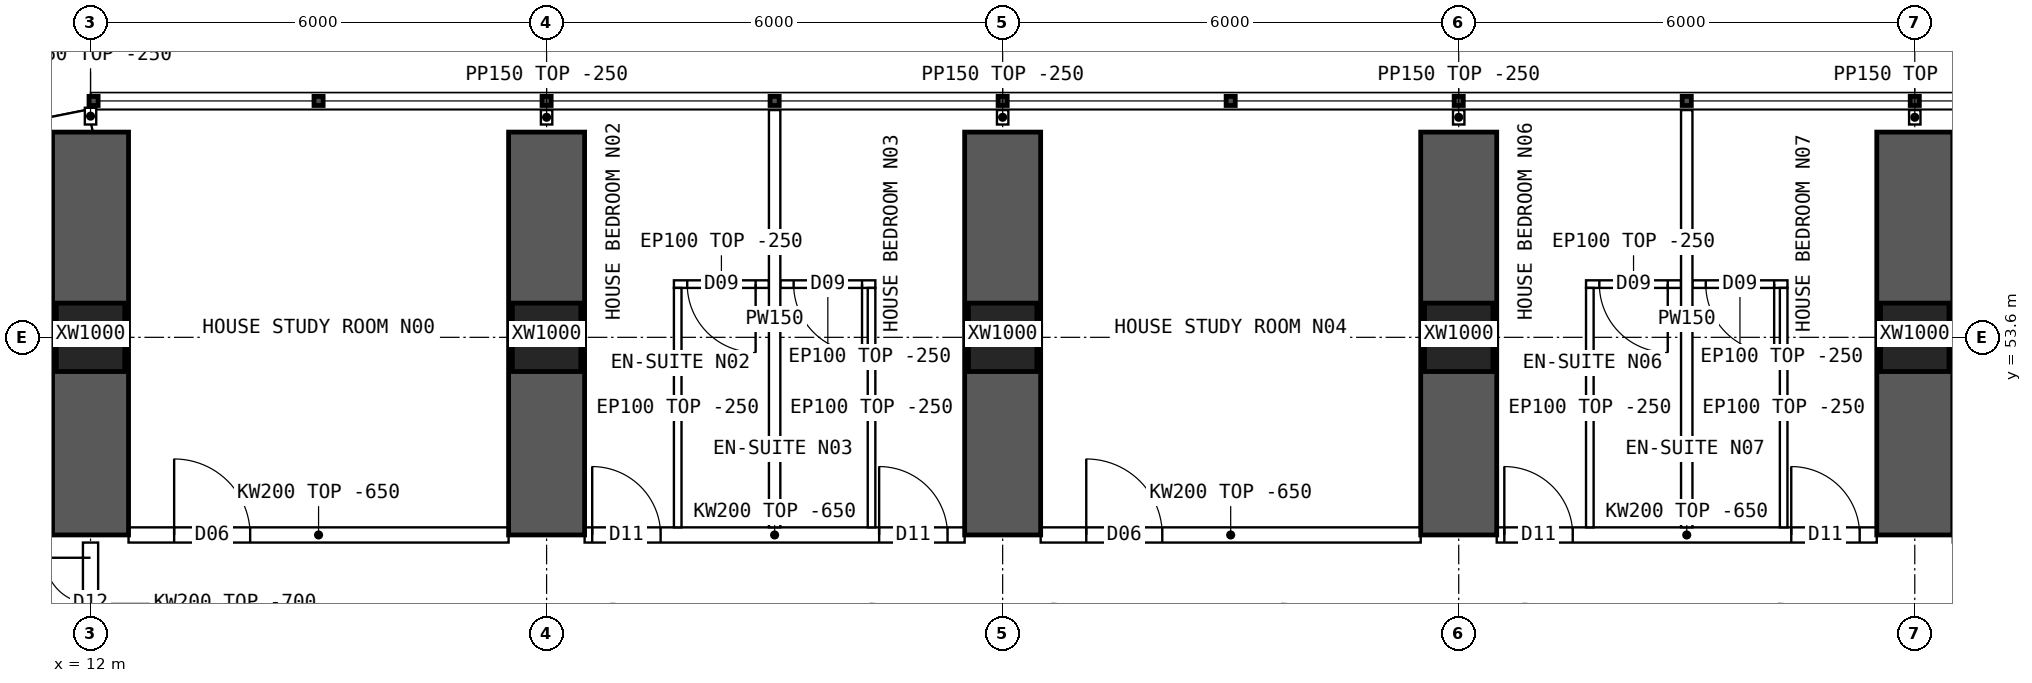
"""IFC4 building model, lengths in metres.
Left out: names, types, materials, properties, quantities, classifications, styles, units other than length and angle.
Written with IfcOpenShell. Run it as: python <this file> out.ifc"""

import sys

from ifc_helpers import new_model, si_unit, direction, frame, frame_2d, origin, origin_2d, place, context, subcontext, project, spatial, polyline, rectangle, hollow_rectangle, outline, extrude, element, fill, save


model = new_model("IFC4")
c1 = context("Model", 3, precision=1e-05, world=origin(), true_north=direction((0.0, 1.0)))
c2 = subcontext(c1, "Body", "Model", "MODEL_VIEW")
j1 = project(units=[si_unit("LENGTHUNIT", "METRE"), si_unit("PLANEANGLEUNIT", "RADIAN")], contexts=[c1])
p1 = place(None, origin())
s1 = spatial("IfcSite", under=j1, at=p1, CompositionType="ELEMENT")
p2 = place(p1, origin())
s2 = spatial("IfcBuilding", under=s1, at=p2, CompositionType="ELEMENT")
p3 = place(p2, frame((0.0, 0.0, 53.95)))
s3 = spatial("IfcBuildingStorey", under=s2, at=p3, CompositionType="ELEMENT", Elevation=53.95)
for number, where, z_axis, x_axis in (
    (1, (12.0, 53.6, 0.0), (0.0, 0.0, 1.0), (1.0, 0.0, 0.0)),
    (2, (18.0, 53.6, 0.0), (0.0, 0.0, 1.0), (1.0, 0.0, 0.0)),
    (3, (24.0, 53.6, 0.0), (0.0, 0.0, 1.0), (1.0, 0.0, 0.0)),
    (4, (30.0, 53.6, 0.0), (0.0, 0.0, 1.0), (1.0, 0.0, 0.0)),
    (5, (36.0, 53.6, 0.0), (0.0, 0.0, 1.0), (1.0, 0.0, 0.0)),
):
    element("IfcColumn", number, at=place(p3, frame(where, z_axis=z_axis, x_axis=x_axis)), inside=s3, PredefinedType="COLUMN", context=c2, shape_type="SweptSolid", body=[
        extrude(hollow_rectangle(XDim=0.9, YDim=0.9, WallThickness=0.09, at=origin_2d()), origin(), (0.0, 0.0, 1.0), 3.75),
    ])
for number, where, z_axis, x_axis in (
    (6, (12.0, 51.0, 0.0), (0.0, 0.0, 1.0), (0.0, 1.0, 0.0)),
    (7, (18.0, 51.0, 0.0), (0.0, 0.0, 1.0), (0.0, 1.0, 0.0)),
    (8, (24.0, 51.0, 0.0), (0.0, 0.0, 1.0), (0.0, 1.0, 0.0)),
    (9, (30.0, 51.0, 0.0), (0.0, 0.0, 1.0), (0.0, 1.0, 0.0)),
    (10, (36.0, 51.0, 0.0), (0.0, 0.0, 1.0), (0.0, 1.0, 0.0)),
):
    element("IfcWall", number, at=place(p3, frame(where, z_axis=z_axis, x_axis=x_axis)), inside=s3, PredefinedType="SHEAR", context=c2, shape_type="SweptSolid", body=[
        extrude(rectangle(XDim=5.3, YDim=1.0, at=frame_2d((2.65, 0.0))), origin(), (0.0, 0.0, 1.0), 3.75),
    ])
p4 = place(p3, frame((12.0, 56.45, 0.0), z_axis=(0.0, 0.0, 1.0), x_axis=(-0.980787251524, -0.195080412259, 0.0)))
e11 = element("IfcWall", 11, at=p4, inside=s3, PredefinedType="SOLIDWALL", context=c2, shape_type="SweptSolid", body=[
    extrude(outline(polyline([(-0.03, -0.15), (3.249, -0.15), (3.189, 0.15), (0.03, 0.15), (-0.03, -0.15)])), origin(), (0.0, 0.0, 1.0), 3.5),
])
p5 = place(p4, frame((0.909, 0.0, 0.9)))
e12 = element("IfcOpeningElement", 12, at=p5, cuts=e11, PredefinedType="OPENING", context=c2, shape_type="SweptSolid", body=[
    extrude(rectangle(XDim=1.4, YDim=1.8, at=frame_2d((0.7, 0.9))), frame((0.0, 0.16, 0.0), z_axis=(0.0, -1.0, 0.0), x_axis=(1.0, 0.0, 0.0)), (0.0, 0.0, 1.0), 0.32),
])
p6 = place(p3, frame((12.5, 51.0, 0.0), z_axis=(0.0, 0.0, 1.0), x_axis=(1.0, 0.0, 0.0)))
e13 = element("IfcWall", 13, at=p6, inside=s3, PredefinedType="SOLIDWALL", context=c2, shape_type="SweptSolid", body=[
    extrude(outline(polyline([(0.0, 0.0), (5.0, 0.0), (5.0, 3.1), (0.0, 3.1), (0.0, 0.0)])), frame((0.0, 0.1, 0.0), z_axis=(0.0, -1.0, 0.0), x_axis=(1.0, 0.0, 0.0)), (0.0, 0.0, 1.0), 0.2),
])
p7 = place(p6, frame((0.6, 0.0, 0.0)))
e14 = element("IfcOpeningElement", 14, at=p7, cuts=e13, PredefinedType="OPENING", context=c2, shape_type="SweptSolid", body=[
    extrude(rectangle(XDim=1.0, YDim=2.1, at=frame_2d((0.5, 1.05))), frame((0.0, 0.11, 0.0), z_axis=(0.0, -1.0, 0.0), x_axis=(1.0, 0.0, 0.0)), (0.0, 0.0, 1.0), 0.22),
])
p8 = place(p3, frame((18.5, 51.0, 0.0), z_axis=(0.0, 0.0, 1.0), x_axis=(1.0, 0.0, 0.0)))
e15 = element("IfcWall", 15, at=p8, inside=s3, PredefinedType="SOLIDWALL", context=c2, shape_type="SweptSolid", body=[
    extrude(outline(polyline([(0.0, 0.0), (5.0, 0.0), (5.0, 3.1), (0.0, 3.1), (0.0, 0.0)])), frame((0.0, 0.1, 0.0), z_axis=(0.0, -1.0, 0.0), x_axis=(1.0, 0.0, 0.0)), (0.0, 0.0, 1.0), 0.2),
])
p9 = place(p8, frame((0.1, 0.0, 0.0)))
e16 = element("IfcOpeningElement", 16, at=p9, cuts=e15, PredefinedType="OPENING", context=c2, shape_type="SweptSolid", body=[
    extrude(rectangle(XDim=0.9, YDim=2.1, at=frame_2d((0.45, 1.05))), frame((0.0, 0.11, 0.0), z_axis=(0.0, -1.0, 0.0), x_axis=(1.0, 0.0, 0.0)), (0.0, 0.0, 1.0), 0.22),
])
p10 = place(p8, frame((3.875, 0.0, 0.0)))
e17 = element("IfcOpeningElement", 17, at=p10, cuts=e15, PredefinedType="OPENING", context=c2, shape_type="SweptSolid", body=[
    extrude(rectangle(XDim=0.9, YDim=2.1, at=frame_2d((0.45, 1.05))), frame((0.0, 0.11, 0.0), z_axis=(0.0, -1.0, 0.0), x_axis=(1.0, 0.0, 0.0)), (0.0, 0.0, 1.0), 0.22),
])
p11 = place(p3, frame((24.5, 51.0, 0.0), z_axis=(0.0, 0.0, 1.0), x_axis=(1.0, 0.0, 0.0)))
e18 = element("IfcWall", 18, at=p11, inside=s3, PredefinedType="SOLIDWALL", context=c2, shape_type="SweptSolid", body=[
    extrude(outline(polyline([(0.0, 0.0), (5.0, 0.0), (5.0, 3.1), (0.0, 3.1), (0.0, 0.0)])), frame((0.0, 0.1, 0.0), z_axis=(0.0, -1.0, 0.0), x_axis=(1.0, 0.0, 0.0)), (0.0, 0.0, 1.0), 0.2),
])
p12 = place(p11, frame((0.6, 0.0, 0.0)))
e19 = element("IfcOpeningElement", 19, at=p12, cuts=e18, PredefinedType="OPENING", context=c2, shape_type="SweptSolid", body=[
    extrude(rectangle(XDim=1.0, YDim=2.1, at=frame_2d((0.5, 1.05))), frame((0.0, 0.11, 0.0), z_axis=(0.0, -1.0, 0.0), x_axis=(1.0, 0.0, 0.0)), (0.0, 0.0, 1.0), 0.22),
])
p13 = place(p3, frame((30.5, 51.0, 0.0), z_axis=(0.0, 0.0, 1.0), x_axis=(1.0, 0.0, 0.0)))
e20 = element("IfcWall", 20, at=p13, inside=s3, PredefinedType="SOLIDWALL", context=c2, shape_type="SweptSolid", body=[
    extrude(outline(polyline([(0.0, 0.0), (5.0, 0.0), (5.0, 3.1), (0.0, 3.1), (0.0, 0.0)])), frame((0.0, 0.1, 0.0), z_axis=(0.0, -1.0, 0.0), x_axis=(1.0, 0.0, 0.0)), (0.0, 0.0, 1.0), 0.2),
])
p14 = place(p13, frame((0.1, 0.0, 0.0)))
e21 = element("IfcOpeningElement", 21, at=p14, cuts=e20, PredefinedType="OPENING", context=c2, shape_type="SweptSolid", body=[
    extrude(rectangle(XDim=0.9, YDim=2.1, at=frame_2d((0.45, 1.05))), frame((0.0, 0.11, 0.0), z_axis=(0.0, -1.0, 0.0), x_axis=(1.0, 0.0, 0.0)), (0.0, 0.0, 1.0), 0.22),
])
p15 = place(p13, frame((3.875, 0.0, 0.0)))
e22 = element("IfcOpeningElement", 22, at=p15, cuts=e20, PredefinedType="OPENING", context=c2, shape_type="SweptSolid", body=[
    extrude(rectangle(XDim=0.9, YDim=2.1, at=frame_2d((0.45, 1.05))), frame((0.0, 0.11, 0.0), z_axis=(0.0, -1.0, 0.0), x_axis=(1.0, 0.0, 0.0)), (0.0, 0.0, 1.0), 0.22),
])
p16 = place(p3, frame((21.0, 56.59, 0.0), z_axis=(0.0, 0.0, 1.0), x_axis=(0.0, -1.0, 0.0)))
e23 = element("IfcWall", 23, at=p16, inside=s3, PredefinedType="PARTITIONING", context=c2, shape_type="SweptSolid", body=[
    extrude(outline(polyline([(0.0, 0.0), (5.49, 0.0), (5.49, 3.1), (5.442, 3.1), (5.44, 3.5), (3.192, 3.5), (3.19, 3.1), (2.792, 3.1), (2.79, 3.5), (0.0, 3.5), (0.0, 0.0)])), frame((0.0, 0.075, 0.0), z_axis=(0.0, -1.0, 0.0), x_axis=(1.0, 0.0, 0.0)), (0.0, 0.0, 1.0), 0.15),
])
p17 = place(p3, frame((19.675, 54.3, 0.0), z_axis=(0.0, 0.0, 1.0), x_axis=(1.0, 0.0, 0.0)))
e24 = element("IfcWall", 24, at=p17, inside=s3, PredefinedType="PARTITIONING", context=c2, shape_type="SweptSolid", body=[
    extrude(rectangle(XDim=1.25, YDim=0.1, at=frame_2d((0.625, 0.0))), origin(), (0.0, 0.0, 1.0), 3.5),
])
p18 = place(p17, frame((0.175, 0.0, 0.0)))
e25 = element("IfcOpeningElement", 25, at=p18, cuts=e24, PredefinedType="OPENING", context=c2, shape_type="SweptSolid", body=[
    extrude(rectangle(XDim=0.9, YDim=2.1, at=frame_2d((0.45, 1.05))), frame((0.0, 0.06, 0.0), z_axis=(0.0, -1.0, 0.0), x_axis=(1.0, 0.0, 0.0)), (0.0, 0.0, 1.0), 0.12),
])
p19 = place(p3, frame((19.725, 54.25, 0.0), z_axis=(0.0, 0.0, 1.0), x_axis=(0.0, -1.0, 0.0)))
e26 = element("IfcWall", 26, at=p19, inside=s3, PredefinedType="PARTITIONING", context=c2, shape_type="SweptSolid", body=[
    extrude(outline(polyline([(0.0, 0.0), (3.15, 0.0), (3.15, 3.1), (3.102, 3.1), (3.1, 3.5), (0.852, 3.5), (0.85, 3.1), (0.452, 3.1), (0.45, 3.5), (0.0, 3.5), (0.0, 0.0)])), frame((0.0, 0.05, 0.0), z_axis=(0.0, -1.0, 0.0), x_axis=(1.0, 0.0, 0.0)), (0.0, 0.0, 1.0), 0.1),
])
p20 = place(p3, frame((21.075, 54.3, 0.0), z_axis=(0.0, 0.0, 1.0), x_axis=(1.0, 0.0, 0.0)))
e27 = element("IfcWall", 27, at=p20, inside=s3, PredefinedType="PARTITIONING", context=c2, shape_type="SweptSolid", body=[
    extrude(rectangle(XDim=1.25, YDim=0.1, at=frame_2d((0.625, 0.0))), origin(), (0.0, 0.0, 1.0), 3.5),
])
p21 = place(p20, frame((0.175, 0.0, 0.0)))
e28 = element("IfcOpeningElement", 28, at=p21, cuts=e27, PredefinedType="OPENING", context=c2, shape_type="SweptSolid", body=[
    extrude(rectangle(XDim=0.9, YDim=2.1, at=frame_2d((0.45, 1.05))), frame((0.0, 0.06, 0.0), z_axis=(0.0, -1.0, 0.0), x_axis=(1.0, 0.0, 0.0)), (0.0, 0.0, 1.0), 0.12),
])
p22 = place(p3, frame((22.275, 54.25, 0.0), z_axis=(0.0, 0.0, 1.0), x_axis=(0.0, -1.0, 0.0)))
e29 = element("IfcWall", 29, at=p22, inside=s3, PredefinedType="PARTITIONING", context=c2, shape_type="SweptSolid", body=[
    extrude(outline(polyline([(0.0, 0.0), (3.15, 0.0), (3.15, 3.1), (3.102, 3.1), (3.1, 3.5), (0.852, 3.5), (0.85, 3.1), (0.452, 3.1), (0.45, 3.5), (0.0, 3.5), (0.0, 0.0)])), frame((0.0, 0.05, 0.0), z_axis=(0.0, -1.0, 0.0), x_axis=(1.0, 0.0, 0.0)), (0.0, 0.0, 1.0), 0.1),
])
p23 = place(p3, frame((33.0, 56.59, 0.0), z_axis=(0.0, 0.0, 1.0), x_axis=(0.0, -1.0, 0.0)))
e30 = element("IfcWall", 30, at=p23, inside=s3, PredefinedType="PARTITIONING", context=c2, shape_type="SweptSolid", body=[
    extrude(outline(polyline([(0.0, 0.0), (5.49, 0.0), (5.49, 3.1), (5.442, 3.1), (5.44, 3.5), (3.192, 3.5), (3.19, 3.1), (2.792, 3.1), (2.79, 3.5), (0.0, 3.5), (0.0, 0.0)])), frame((0.0, 0.075, 0.0), z_axis=(0.0, -1.0, 0.0), x_axis=(1.0, 0.0, 0.0)), (0.0, 0.0, 1.0), 0.15),
])
p24 = place(p3, frame((31.675, 54.3, 0.0), z_axis=(0.0, 0.0, 1.0), x_axis=(1.0, 0.0, 0.0)))
e31 = element("IfcWall", 31, at=p24, inside=s3, PredefinedType="PARTITIONING", context=c2, shape_type="SweptSolid", body=[
    extrude(rectangle(XDim=1.25, YDim=0.1, at=frame_2d((0.625, 0.0))), origin(), (0.0, 0.0, 1.0), 3.5),
])
p25 = place(p24, frame((0.175, 0.0, 0.0)))
e32 = element("IfcOpeningElement", 32, at=p25, cuts=e31, PredefinedType="OPENING", context=c2, shape_type="SweptSolid", body=[
    extrude(rectangle(XDim=0.9, YDim=2.1, at=frame_2d((0.45, 1.05))), frame((0.0, 0.06, 0.0), z_axis=(0.0, -1.0, 0.0), x_axis=(1.0, 0.0, 0.0)), (0.0, 0.0, 1.0), 0.12),
])
p26 = place(p3, frame((31.725, 54.25, 0.0), z_axis=(0.0, 0.0, 1.0), x_axis=(0.0, -1.0, 0.0)))
e33 = element("IfcWall", 33, at=p26, inside=s3, PredefinedType="PARTITIONING", context=c2, shape_type="SweptSolid", body=[
    extrude(outline(polyline([(0.0, 0.0), (3.15, 0.0), (3.15, 3.1), (3.102, 3.1), (3.1, 3.5), (0.852, 3.5), (0.85, 3.1), (0.452, 3.1), (0.45, 3.5), (0.0, 3.5), (0.0, 0.0)])), frame((0.0, 0.05, 0.0), z_axis=(0.0, -1.0, 0.0), x_axis=(1.0, 0.0, 0.0)), (0.0, 0.0, 1.0), 0.1),
])
p27 = place(p3, frame((33.075, 54.3, 0.0), z_axis=(0.0, 0.0, 1.0), x_axis=(1.0, 0.0, 0.0)))
e34 = element("IfcWall", 34, at=p27, inside=s3, PredefinedType="PARTITIONING", context=c2, shape_type="SweptSolid", body=[
    extrude(rectangle(XDim=1.25, YDim=0.1, at=frame_2d((0.625, 0.0))), origin(), (0.0, 0.0, 1.0), 3.5),
])
p28 = place(p27, frame((0.175, 0.0, 0.0)))
e35 = element("IfcOpeningElement", 35, at=p28, cuts=e34, PredefinedType="OPENING", context=c2, shape_type="SweptSolid", body=[
    extrude(rectangle(XDim=0.9, YDim=2.1, at=frame_2d((0.45, 1.05))), frame((0.0, 0.06, 0.0), z_axis=(0.0, -1.0, 0.0), x_axis=(1.0, 0.0, 0.0)), (0.0, 0.0, 1.0), 0.12),
])
p29 = place(p3, frame((34.275, 54.25, 0.0), z_axis=(0.0, 0.0, 1.0), x_axis=(0.0, -1.0, 0.0)))
e36 = element("IfcWall", 36, at=p29, inside=s3, PredefinedType="PARTITIONING", context=c2, shape_type="SweptSolid", body=[
    extrude(outline(polyline([(0.0, 0.0), (3.15, 0.0), (3.15, 3.1), (3.102, 3.1), (3.1, 3.5), (0.852, 3.5), (0.85, 3.1), (0.452, 3.1), (0.45, 3.5), (0.0, 3.5), (0.0, 0.0)])), frame((0.0, 0.05, 0.0), z_axis=(0.0, -1.0, 0.0), x_axis=(1.0, 0.0, 0.0)), (0.0, 0.0, 1.0), 0.1),
])
p30 = place(p3, frame((12.0, 49.3, 0.0), z_axis=(0.0, 0.0, 1.0), x_axis=(0.0, 1.0, 0.0)))
e37 = element("IfcWall", 37, at=p30, inside=s3, PredefinedType="SOLIDWALL", context=c2, shape_type="SweptSolid", body=[
    extrude(outline(polyline([(0.0, 0.0), (1.6, 0.0), (1.6, 3.05), (0.0, 3.05), (0.0, 0.0)])), frame((0.0, 0.1, 0.0), z_axis=(0.0, -1.0, 0.0), x_axis=(1.0, 0.0, 0.0)), (0.0, 0.0, 1.0), 0.2),
])
p31 = place(p30, frame((0.2, 0.0, 0.0)))
e38 = element("IfcOpeningElement", 38, at=p31, cuts=e37, PredefinedType="OPENING", context=c2, shape_type="SweptSolid", body=[
    extrude(rectangle(XDim=1.2, YDim=2.1, at=frame_2d((0.6, 1.05))), frame((0.0, 0.11, 0.0), z_axis=(0.0, -1.0, 0.0), x_axis=(1.0, 0.0, 0.0)), (0.0, 0.0, 1.0), 0.22),
])
p32 = place(p3, frame((12.0, 56.4, 0.0), z_axis=(0.0, 0.0, 1.0), x_axis=(0.0, 1.0, 0.0)))
e39 = element("IfcWall", 39, at=p32, inside=s3, PredefinedType="PARTITIONING", context=c2, shape_type="SweptSolid", body=[
    extrude(rectangle(XDim=0.22, YDim=0.15, at=frame_2d((0.11, 0.0))), origin(), (0.0, 0.0, 1.0), 3.5),
])
for number, where, z_axis, x_axis in (
    (40, (18.0, 56.4, 0.0), (0.0, 0.0, 1.0), (0.0, 1.0, 0.0)),
    (41, (24.0, 56.4, 0.0), (0.0, 0.0, 1.0), (0.0, 1.0, 0.0)),
    (42, (30.0, 56.4, 0.0), (0.0, 0.0, 1.0), (0.0, 1.0, 0.0)),
    (43, (36.0, 56.4, 0.0), (0.0, 0.0, 1.0), (0.0, 1.0, 0.0)),
):
    element("IfcWall", number, at=place(p3, frame(where, z_axis=z_axis, x_axis=x_axis)), inside=s3, PredefinedType="PARTITIONING", context=c2, shape_type="SweptSolid", body=[
        extrude(rectangle(XDim=0.19, YDim=0.15, at=frame_2d((0.095, 0.0))), origin(), (0.0, 0.0, 1.0), 3.5),
    ])
p33 = place(p7, origin())
e44 = element("IfcDoor", 44, at=p33, inside=s3, OperationType="SINGLE_SWING_LEFT", PredefinedType="DOOR", context=c2, shape_type="SweptSolid", body=[
    extrude(rectangle(XDim=1.0, YDim=2.1, at=frame_2d((0.5, 1.05))), frame((0.0, 0.025, 0.0), z_axis=(0.0, -1.0, 0.0), x_axis=(1.0, 0.0, 0.0)), (0.0, 0.0, 1.0), 0.05),
])
fill(e14, e44)
p34 = place(p18, origin())
e45 = element("IfcDoor", 45, at=p34, inside=s3, OperationType="SINGLE_SWING_RIGHT", PredefinedType="DOOR", context=c2, shape_type="SweptSolid", body=[
    extrude(rectangle(XDim=0.9, YDim=2.1, at=frame_2d((0.45, 1.05))), frame((0.0, 0.025, 0.0), z_axis=(0.0, -1.0, 0.0), x_axis=(1.0, 0.0, 0.0)), (0.0, 0.0, 1.0), 0.05),
])
fill(e25, e45)
p35 = place(p9, origin())
e46 = element("IfcDoor", 46, at=p35, inside=s3, OperationType="SINGLE_SWING_LEFT", PredefinedType="DOOR", context=c2, shape_type="SweptSolid", body=[
    extrude(rectangle(XDim=0.9, YDim=2.1, at=frame_2d((0.45, 1.05))), frame((0.0, 0.025, 0.0), z_axis=(0.0, -1.0, 0.0), x_axis=(1.0, 0.0, 0.0)), (0.0, 0.0, 1.0), 0.05),
])
fill(e16, e46)
p36 = place(p21, origin())
e47 = element("IfcDoor", 47, at=p36, inside=s3, OperationType="SINGLE_SWING_RIGHT", PredefinedType="DOOR", context=c2, shape_type="SweptSolid", body=[
    extrude(rectangle(XDim=0.9, YDim=2.1, at=frame_2d((0.45, 1.05))), frame((0.0, 0.025, 0.0), z_axis=(0.0, -1.0, 0.0), x_axis=(1.0, 0.0, 0.0)), (0.0, 0.0, 1.0), 0.05),
])
fill(e28, e47)
p37 = place(p10, origin())
e48 = element("IfcDoor", 48, at=p37, inside=s3, OperationType="SINGLE_SWING_LEFT", PredefinedType="DOOR", context=c2, shape_type="SweptSolid", body=[
    extrude(rectangle(XDim=0.9, YDim=2.1, at=frame_2d((0.45, 1.05))), frame((0.0, 0.025, 0.0), z_axis=(0.0, -1.0, 0.0), x_axis=(1.0, 0.0, 0.0)), (0.0, 0.0, 1.0), 0.05),
])
fill(e17, e48)
p38 = place(p12, origin())
e49 = element("IfcDoor", 49, at=p38, inside=s3, OperationType="SINGLE_SWING_LEFT", PredefinedType="DOOR", context=c2, shape_type="SweptSolid", body=[
    extrude(rectangle(XDim=1.0, YDim=2.1, at=frame_2d((0.5, 1.05))), frame((0.0, 0.025, 0.0), z_axis=(0.0, -1.0, 0.0), x_axis=(1.0, 0.0, 0.0)), (0.0, 0.0, 1.0), 0.05),
])
fill(e19, e49)
p39 = place(p25, origin())
e50 = element("IfcDoor", 50, at=p39, inside=s3, OperationType="SINGLE_SWING_RIGHT", PredefinedType="DOOR", context=c2, shape_type="SweptSolid", body=[
    extrude(rectangle(XDim=0.9, YDim=2.1, at=frame_2d((0.45, 1.05))), frame((0.0, 0.025, 0.0), z_axis=(0.0, -1.0, 0.0), x_axis=(1.0, 0.0, 0.0)), (0.0, 0.0, 1.0), 0.05),
])
fill(e32, e50)
p40 = place(p14, origin())
e51 = element("IfcDoor", 51, at=p40, inside=s3, OperationType="SINGLE_SWING_LEFT", PredefinedType="DOOR", context=c2, shape_type="SweptSolid", body=[
    extrude(rectangle(XDim=0.9, YDim=2.1, at=frame_2d((0.45, 1.05))), frame((0.0, 0.025, 0.0), z_axis=(0.0, -1.0, 0.0), x_axis=(1.0, 0.0, 0.0)), (0.0, 0.0, 1.0), 0.05),
])
fill(e21, e51)
p41 = place(p28, origin())
e52 = element("IfcDoor", 52, at=p41, inside=s3, OperationType="SINGLE_SWING_RIGHT", PredefinedType="DOOR", context=c2, shape_type="SweptSolid", body=[
    extrude(rectangle(XDim=0.9, YDim=2.1, at=frame_2d((0.45, 1.05))), frame((0.0, 0.025, 0.0), z_axis=(0.0, -1.0, 0.0), x_axis=(1.0, 0.0, 0.0)), (0.0, 0.0, 1.0), 0.05),
])
fill(e35, e52)
p42 = place(p15, origin())
e53 = element("IfcDoor", 53, at=p42, inside=s3, OperationType="SINGLE_SWING_LEFT", PredefinedType="DOOR", context=c2, shape_type="SweptSolid", body=[
    extrude(rectangle(XDim=0.9, YDim=2.1, at=frame_2d((0.45, 1.05))), frame((0.0, 0.025, 0.0), z_axis=(0.0, -1.0, 0.0), x_axis=(1.0, 0.0, 0.0)), (0.0, 0.0, 1.0), 0.05),
])
fill(e22, e53)
p43 = place(p31, origin())
e54 = element("IfcDoor", 54, at=p43, inside=s3, OperationType="DOUBLE_DOOR_SINGLE_SWING", PredefinedType="DOOR", context=c2, shape_type="SweptSolid", body=[
    extrude(rectangle(XDim=1.2, YDim=2.1, at=frame_2d((0.6, 1.05))), frame((0.0, 0.025, 0.0), z_axis=(0.0, -1.0, 0.0), x_axis=(1.0, 0.0, 0.0)), (0.0, 0.0, 1.0), 0.05),
])
fill(e38, e54)
save(model, sys.argv[1])
